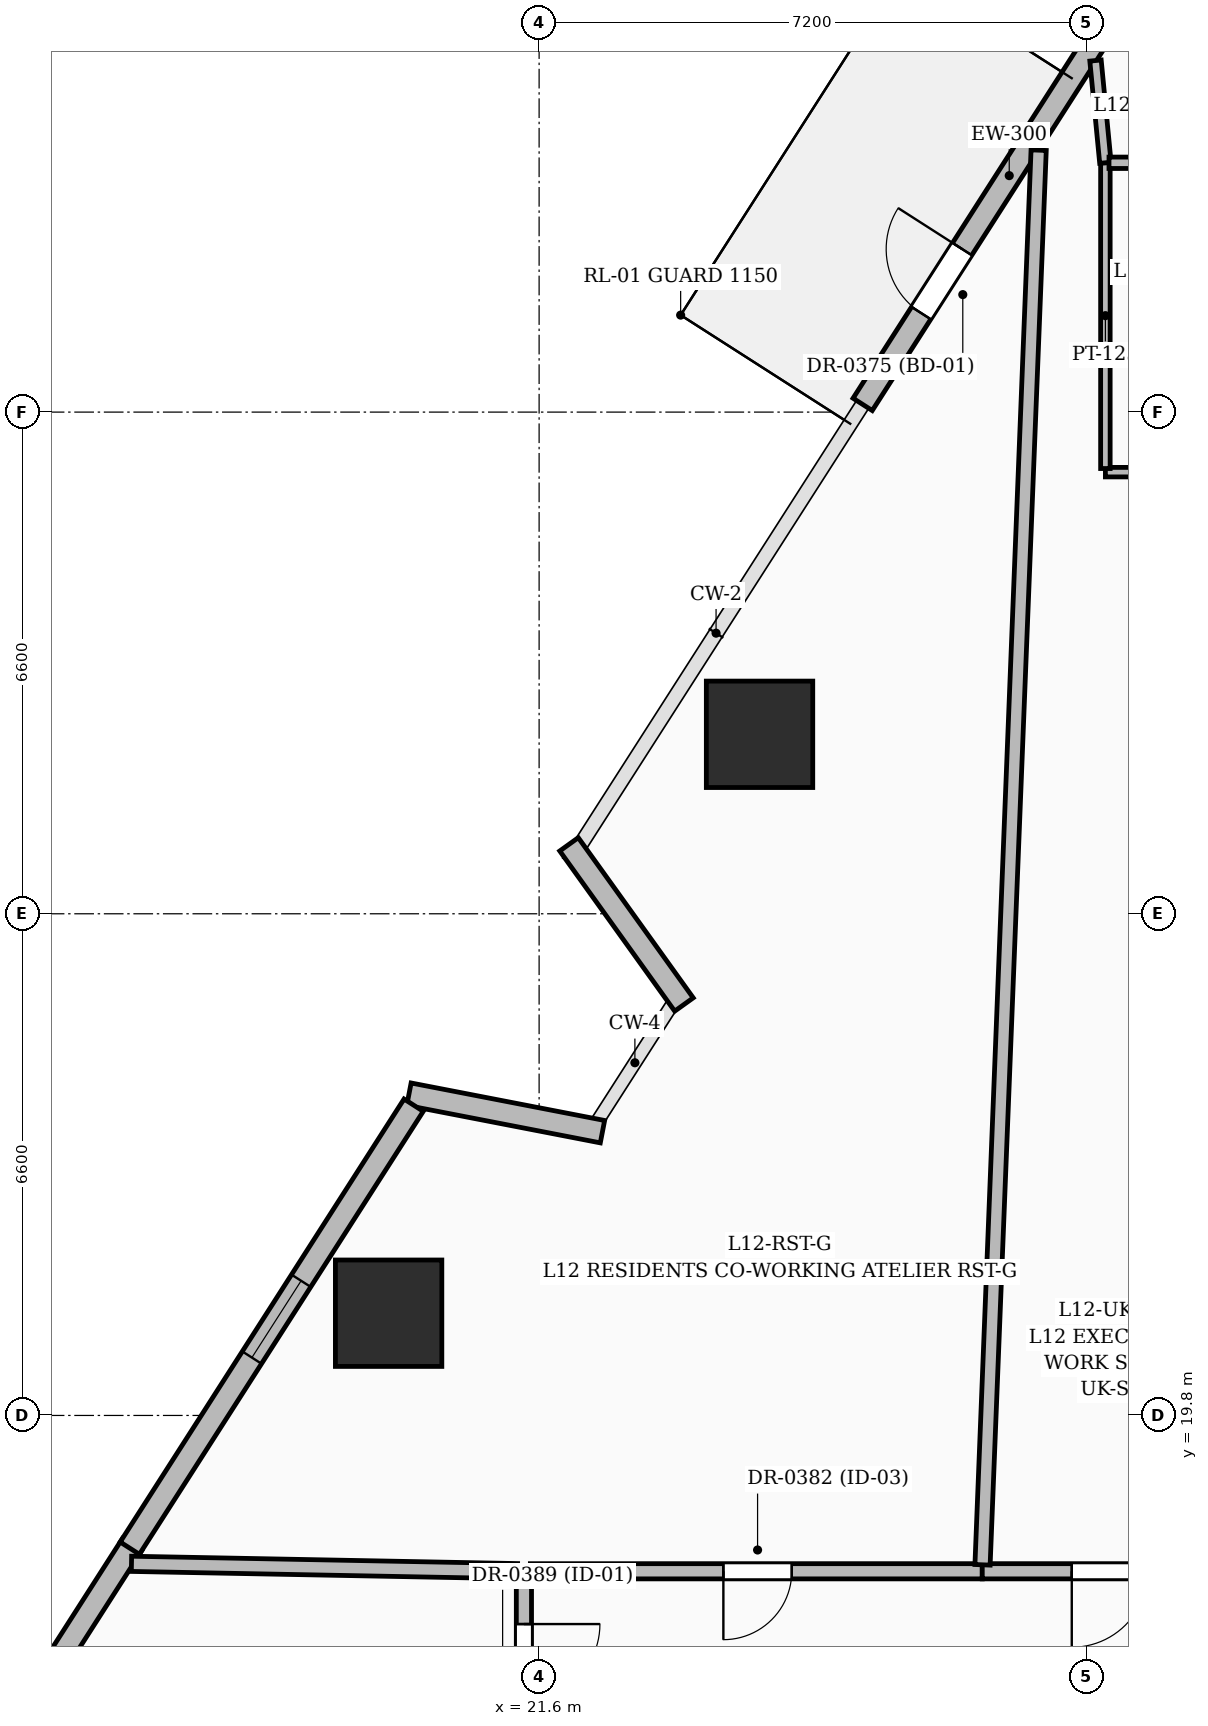
"""IFC4 building model, lengths in metres.
Left out: names, types, materials, properties, quantities, classifications, styles, units other than length and angle.
Written with IfcOpenShell. Run it as: python <this file> out.ifc"""

import sys

from ifc_helpers import new_model, si_unit, direction, frame, frame_2d, origin, origin_2d, place, context, subcontext, project, spatial, rectangle, extrude, element, fill, save


model = new_model("IFC4")
c1 = context("Model", 3, precision=1e-05, world=origin(), true_north=direction((0.0, 1.0)))
c2 = subcontext(c1, "Body", "Model", "MODEL_VIEW")
j1 = project(units=[si_unit("LENGTHUNIT", "METRE"), si_unit("PLANEANGLEUNIT", "RADIAN")], contexts=[c1])
p1 = place(None, origin())
s1 = spatial("IfcSite", under=j1, at=p1, CompositionType="ELEMENT")
p2 = place(p1, origin())
s2 = spatial("IfcBuilding", under=s1, at=p2, CompositionType="ELEMENT")
p3 = place(p2, frame((0.0, 0.0, 53.4)))
s3 = spatial("IfcBuildingStorey", under=s2, at=p3, CompositionType="ELEMENT", Elevation=53.4)
for number, where, z_axis, x_axis in (
    (1, (24.5, 28.761, 0.0), (0.0, 0.0, 1.0), (1.0, 0.0, 0.0)),
    (2, (19.62, 21.145, 0.0), (0.0, 0.0, 1.0), (1.0, 0.0, 0.0)),
):
    element("IfcColumn", number, at=place(p3, frame(where, z_axis=z_axis, x_axis=x_axis)), inside=s3, PredefinedType="COLUMN", context=c2, shape_type="SweptSolid", body=[
        extrude(rectangle(XDim=1.4, YDim=1.4, at=origin_2d()), origin(), (0.0, 0.0, 1.0), 3.6),
    ])
p4 = place(p3, frame((19.888, 24.027, 0.0), z_axis=(0.0, 0.0, 1.0), x_axis=(0.981746971615, -0.190191702567, 0.0)))
e3 = element("IfcWall", 3, at=p4, inside=s3, PredefinedType="SOLIDWALL", context=c2, shape_type="SweptSolid", body=[
    extrude(rectangle(XDim=2.593, YDim=0.3, at=frame_2d((1.296, 0.0))), origin(), (0.0, 0.0, 1.0), 2.375),
])
p5 = place(p3, frame((23.506, 25.206, 0.0), z_axis=(0.0, 0.0, 1.0), x_axis=(-0.58299973372, 0.812472344442, 0.0)))
e4 = element("IfcWall", 4, at=p5, inside=s3, PredefinedType="SOLIDWALL", context=c2, shape_type="SweptSolid", body=[
    extrude(rectangle(XDim=2.594, YDim=0.3, at=frame_2d((1.297, 0.0))), origin(), (0.0, 0.0, 1.0), 2.375),
])
p6 = place(p3, frame((25.856, 33.101, 0.0), z_axis=(0.0, 0.0, 1.0), x_axis=(0.539509086386, 0.841979777493, 0.0)))
e5 = element("IfcWall", 5, at=p6, inside=s3, PredefinedType="SOLIDWALL", context=c2, shape_type="SweptSolid", body=[
    extrude(rectangle(XDim=7.149, YDim=0.3, at=frame_2d((3.574, 0.0))), origin(), (0.0, 0.0, 1.0), 3.35),
])
p7 = place(p6, frame((1.427, 0.0, 0.0)))
e6 = element("IfcOpeningElement", 6, at=p7, cuts=e5, PredefinedType="OPENING", context=c2, shape_type="SweptSolid", body=[
    extrude(rectangle(XDim=1.0, YDim=2.2, at=frame_2d((0.5, 1.1))), frame((0.0, 0.16, 0.0), z_axis=(0.0, -1.0, 0.0), x_axis=(1.0, 0.0, 0.0)), (0.0, 0.0, 1.0), 0.32),
])
p8 = place(p3, frame((12.386, 12.079, 0.0), z_axis=(0.0, 0.0, 1.0), x_axis=(0.539509086386, 0.841979777493, 0.0)))
e7 = element("IfcWall", 7, at=p8, inside=s3, PredefinedType="SOLIDWALL", context=c2, shape_type="SweptSolid", body=[
    extrude(rectangle(XDim=7.149, YDim=0.3, at=frame_2d((3.574, 0.0))), origin(), (0.0, 0.0, 1.0), 3.35),
])
p9 = place(p8, frame((1.9, 0.0, 0.6)))
e8 = element("IfcOpeningElement", 8, at=p9, cuts=e7, PredefinedType="OPENING", context=c2, shape_type="SweptSolid", body=[
    extrude(rectangle(XDim=1.5, YDim=2.1, at=frame_2d((0.75, 1.05))), frame((0.0, 0.16, 0.0), z_axis=(0.0, -1.0, 0.0), x_axis=(1.0, 0.0, 0.0)), (0.0, 0.0, 1.0), 0.32),
])
p10 = place(p3, frame((16.215, 18.054, 0.0), z_axis=(0.0, 0.0, 1.0), x_axis=(0.539527015547, 0.841968288889, 0.0)))
e9 = element("IfcWall", 9, at=p10, inside=s3, PredefinedType="SOLIDWALL", context=c2, shape_type="SweptSolid", body=[
    extrude(rectangle(XDim=6.922, YDim=0.3, at=frame_2d((3.461, 0.0))), origin(), (0.0, 0.0, 1.0), 3.35),
])
p11 = place(p10, frame((2.978, 0.0, 0.8)))
e10 = element("IfcOpeningElement", 10, at=p11, cuts=e9, PredefinedType="OPENING", context=c2, shape_type="SweptSolid", body=[
    extrude(rectangle(XDim=1.2, YDim=1.8, at=frame_2d((0.6, 0.9))), frame((0.0, 0.16, 0.0), z_axis=(0.0, -1.0, 0.0), x_axis=(1.0, 0.0, 0.0)), (0.0, 0.0, 1.0), 0.32),
])
p12 = place(p3, frame((21.4, 17.75, 0.0), z_axis=(0.0, 0.0, 1.0), x_axis=(0.0, -1.0, 0.0)))
e11 = element("IfcWall", 11, at=p12, inside=s3, PredefinedType="PARTITIONING", context=c2, shape_type="SweptSolid", body=[
    extrude(rectangle(XDim=2.5, YDim=0.2, at=frame_2d((1.25, 0.0))), origin(), (0.0, 0.0, 1.0), 3.35),
])
p13 = place(p12, frame((0.695, 0.0, 0.0)))
e12 = element("IfcOpeningElement", 12, at=p13, cuts=e11, PredefinedType="OPENING", context=c2, shape_type="SweptSolid", body=[
    extrude(rectangle(XDim=1.0, YDim=2.2, at=frame_2d((0.5, 1.1))), frame((0.0, 0.11, 0.0), z_axis=(0.0, -1.0, 0.0), x_axis=(1.0, 0.0, 0.0)), (0.0, 0.0, 1.0), 0.22),
])
p14 = place(p3, frame((27.43, 17.75, 0.0), z_axis=(0.0, 0.0, 1.0), x_axis=(-1.0, 0.0, 0.0)))
e13 = element("IfcWall", 13, at=p14, inside=s3, PredefinedType="PARTITIONING", context=c2, shape_type="SweptSolid", body=[
    extrude(rectangle(XDim=5.945, YDim=0.2, at=frame_2d((2.972, 0.0))), origin(), (0.0, 0.0, 1.0), 2.279),
])
p15 = place(p14, frame((2.506, 0.0, 0.0)))
e14 = element("IfcOpeningElement", 14, at=p15, cuts=e13, PredefinedType="OPENING", context=c2, shape_type="SweptSolid", body=[
    extrude(rectangle(XDim=0.9, YDim=2.1, at=frame_2d((0.45, 1.05))), frame((0.0, 0.11, 0.0), z_axis=(0.0, -1.0, 0.0), x_axis=(1.0, 0.0, 0.0)), (0.0, 0.0, 1.0), 0.22),
])
p16 = place(p3, frame((30.67, 17.75, 0.0), z_axis=(0.0, 0.0, 1.0), x_axis=(-1.0, 0.0, 0.0)))
e15 = element("IfcWall", 15, at=p16, inside=s3, PredefinedType="PARTITIONING", context=c2, shape_type="SweptSolid", body=[
    extrude(rectangle(XDim=3.24, YDim=0.2, at=frame_2d((1.62, 0.0))), origin(), (0.0, 0.0, 1.0), 3.35),
])
p17 = place(p16, frame((1.062, 0.0, 0.0)))
e16 = element("IfcOpeningElement", 16, at=p17, cuts=e15, PredefinedType="OPENING", context=c2, shape_type="SweptSolid", body=[
    extrude(rectangle(XDim=1.0, YDim=2.2, at=frame_2d((0.5, 1.1))), frame((0.0, 0.11, 0.0), z_axis=(0.0, -1.0, 0.0), x_axis=(1.0, 0.0, 0.0)), (0.0, 0.0, 1.0), 0.22),
])
p18 = place(p3, frame((21.315, 17.751, 0.0), z_axis=(0.0, 0.0, 1.0), x_axis=(-0.999818800326, 0.019035926964, 0.0)))
e17 = element("IfcWall", 17, at=p18, inside=s3, PredefinedType="PARTITIONING", context=c2, shape_type="SweptSolid", body=[
    extrude(rectangle(XDim=5.079, YDim=0.2, at=frame_2d((2.54, 0.0))), origin(), (0.0, 0.0, 1.0), 2.37),
])
p19 = place(p3, frame((27.434, 17.835, 0.0), z_axis=(0.0, 0.0, 1.0), x_axis=(0.039650813079, 0.999213597296, 0.0)))
e18 = element("IfcWall", 18, at=p19, inside=s3, PredefinedType="PARTITIONING", context=c2, shape_type="SweptSolid", body=[
    extrude(rectangle(XDim=18.626, YDim=0.2, at=frame_2d((9.313, 0.0))), origin(), (0.0, 0.0, 1.0), 2.279),
])
p20 = place(p3, frame((30.67, 32.21, 0.0), z_axis=(0.0, 0.0, 1.0), x_axis=(-1.0, 0.0, 0.0)))
e19 = element("IfcWall", 19, at=p20, inside=s3, PredefinedType="PARTITIONING", context=c2, shape_type="SweptSolid", body=[
    extrude(rectangle(XDim=1.62, YDim=0.125, at=frame_2d((0.81, 0.0))), origin(), (0.0, 0.0, 1.0), 3.35),
])
p21 = place(p20, frame((0.335, 0.0, 0.0)))
e20 = element("IfcOpeningElement", 20, at=p21, cuts=e19, PredefinedType="OPENING", context=c2, shape_type="SweptSolid", body=[
    extrude(rectangle(XDim=0.95, YDim=2.2, at=frame_2d((0.475, 1.1))), frame((0.0, 0.072, 0.0), z_axis=(0.0, -1.0, 0.0), x_axis=(1.0, 0.0, 0.0)), (0.0, 0.0, 1.0), 0.145),
])
p22 = place(p3, frame((29.05, 32.258, 0.0), z_axis=(0.0, 0.0, 1.0), x_axis=(0.0, 1.0, 0.0)))
e21 = element("IfcWall", 21, at=p22, inside=s3, PredefinedType="PARTITIONING", context=c2, shape_type="SweptSolid", body=[
    extrude(rectangle(XDim=4.022, YDim=0.125, at=frame_2d((2.011, 0.0))), origin(), (0.0, 0.0, 1.0), 2.37),
])
p23 = place(p3, frame((29.05, 36.28, 0.0), z_axis=(0.0, 0.0, 1.0), x_axis=(-0.096301097919, 0.995352248473, 0.0)))
e22 = element("IfcWall", 22, at=p23, inside=s3, PredefinedType="PARTITIONING", context=c2, shape_type="SweptSolid", body=[
    extrude(rectangle(XDim=1.351, YDim=0.15, at=frame_2d((0.676, 0.0))), origin(), (0.0, 0.0, 1.0), 2.37),
])
p24 = place(p3, frame((30.67, 36.28, 0.0), z_axis=(0.0, 0.0, 1.0), x_axis=(-1.0, 0.0, 0.0)))
e23 = element("IfcWall", 23, at=p24, inside=s3, PredefinedType="PARTITIONING", context=c2, shape_type="SweptSolid", body=[
    extrude(rectangle(XDim=1.573, YDim=0.15, at=frame_2d((0.786, 0.0))), origin(), (0.0, 0.0, 1.0), 2.37),
])
p25 = place(p7, origin())
e24 = element("IfcDoor", 24, at=p25, inside=s3, OperationType="SINGLE_SWING_RIGHT", PredefinedType="DOOR", context=c2, shape_type="SweptSolid", body=[
    extrude(rectangle(XDim=1.0, YDim=2.2, at=frame_2d((0.5, 1.1))), frame((0.0, 0.025, 0.0), z_axis=(0.0, -1.0, 0.0), x_axis=(1.0, 0.0, 0.0)), (0.0, 0.0, 1.0), 0.05),
])
fill(e6, e24)
p26 = place(p11, origin())
e25 = element("IfcWindow", 25, at=p26, inside=s3, PartitioningType="SINGLE_PANEL", PredefinedType="WINDOW", context=c2, shape_type="SweptSolid", body=[
    extrude(rectangle(XDim=1.2, YDim=1.8, at=frame_2d((0.6, 0.9))), frame((0.0, 0.03, 0.0), z_axis=(0.0, -1.0, 0.0), x_axis=(1.0, 0.0, 0.0)), (0.0, 0.0, 1.0), 0.06),
])
fill(e10, e25)
p27 = place(p15, origin())
e26 = element("IfcDoor", 26, at=p27, inside=s3, OperationType="SINGLE_SWING_RIGHT", PredefinedType="DOOR", context=c2, shape_type="SweptSolid", body=[
    extrude(rectangle(XDim=0.9, YDim=2.1, at=frame_2d((0.45, 1.05))), frame((0.0, 0.025, 0.0), z_axis=(0.0, -1.0, 0.0), x_axis=(1.0, 0.0, 0.0)), (0.0, 0.0, 1.0), 0.05),
])
fill(e14, e26)
p28 = place(p13, origin())
e27 = element("IfcDoor", 27, at=p28, inside=s3, OperationType="SINGLE_SWING_LEFT", PredefinedType="DOOR", context=c2, shape_type="SweptSolid", body=[
    extrude(rectangle(XDim=1.0, YDim=2.2, at=frame_2d((0.5, 1.1))), frame((0.0, 0.025, 0.0), z_axis=(0.0, -1.0, 0.0), x_axis=(1.0, 0.0, 0.0)), (0.0, 0.0, 1.0), 0.05),
])
fill(e12, e27)
p29 = place(p17, origin())
e28 = element("IfcDoor", 28, at=p29, inside=s3, OperationType="SINGLE_SWING_RIGHT", PredefinedType="DOOR", context=c2, shape_type="SweptSolid", body=[
    extrude(rectangle(XDim=1.0, YDim=2.2, at=frame_2d((0.5, 1.1))), frame((0.0, 0.025, 0.0), z_axis=(0.0, -1.0, 0.0), x_axis=(1.0, 0.0, 0.0)), (0.0, 0.0, 1.0), 0.05),
])
fill(e16, e28)
save(model, sys.argv[1])
